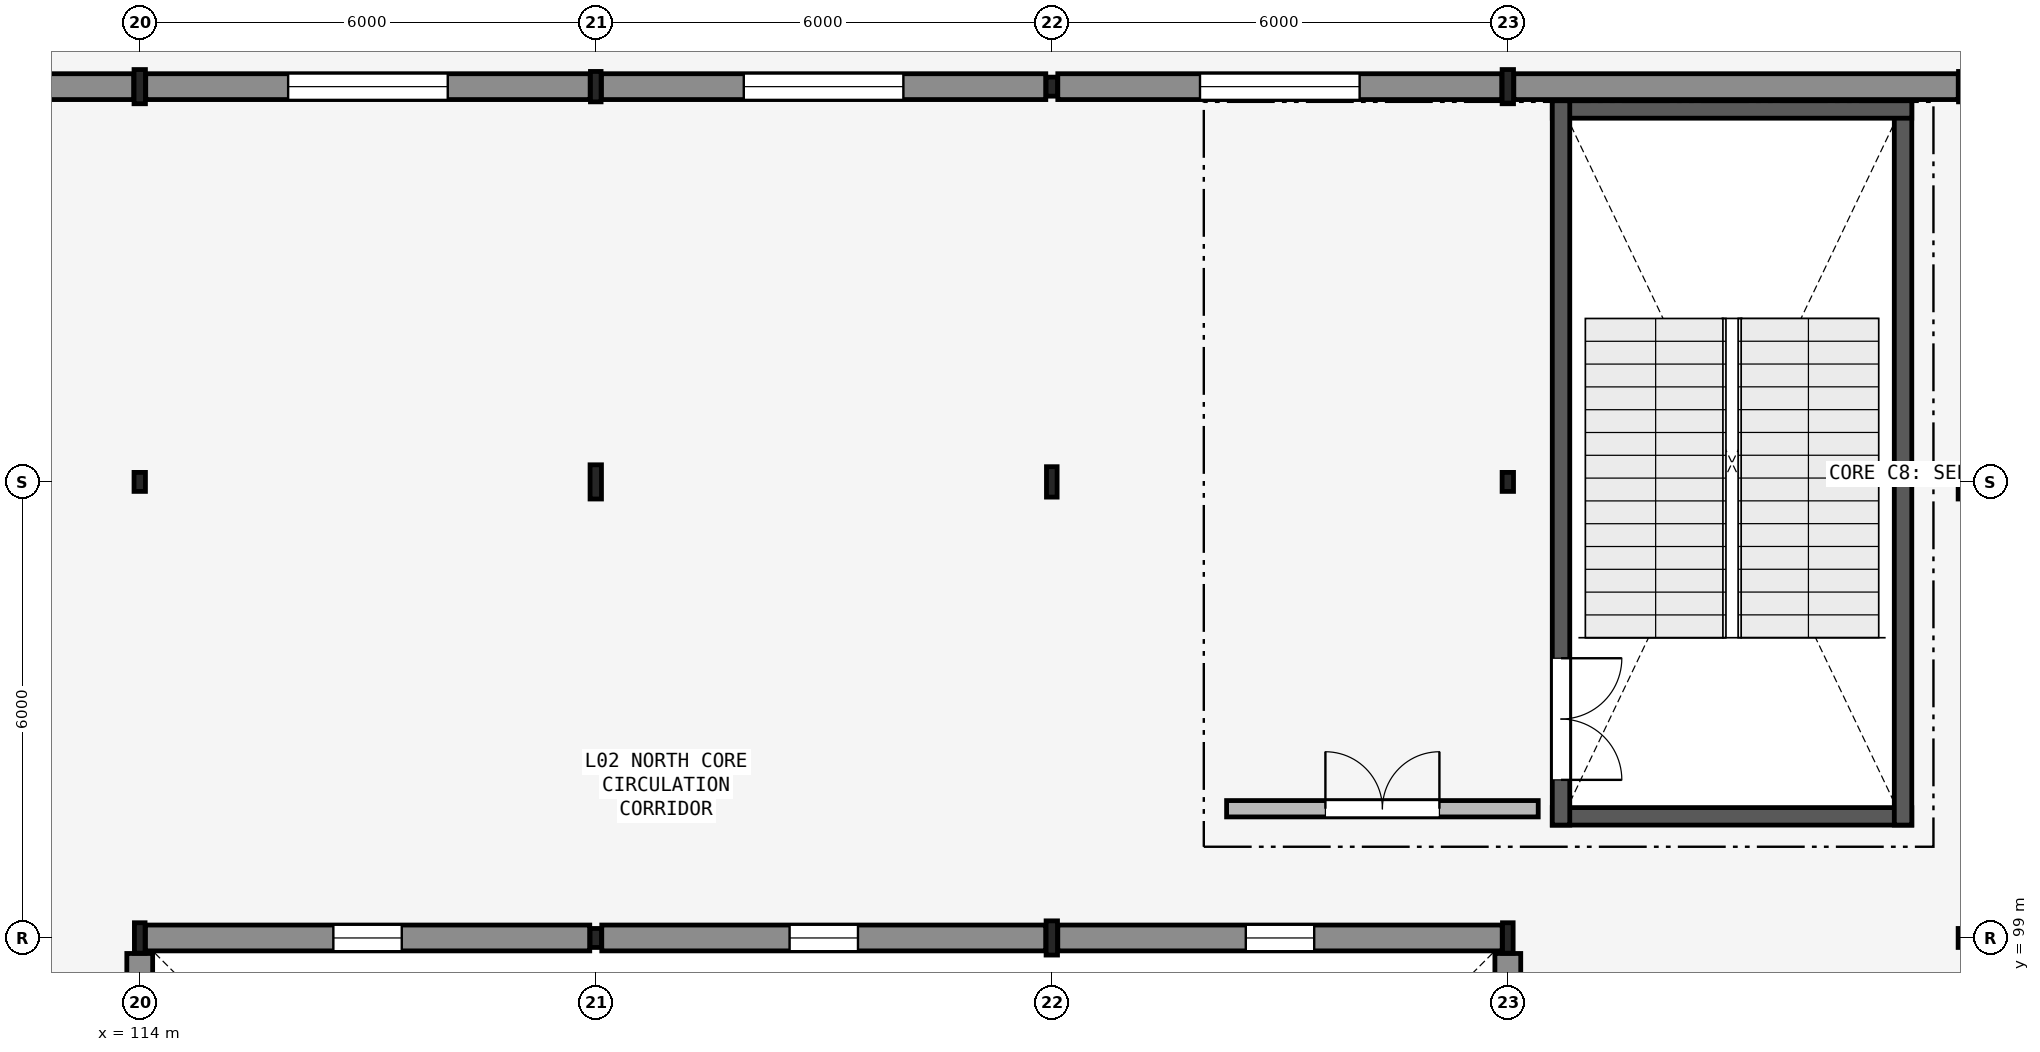
"""IFC4 building model, lengths in metres.
Left out: names, types, materials, properties, quantities, classifications, styles, units other than length and angle.
Written with IfcOpenShell. Run it as: python <this file> out.ifc"""

import sys

from ifc_helpers import new_model, si_unit, direction, frame, frame_2d, origin, origin_2d, place, context, subcontext, project, spatial, rectangle, hollow_rectangle, i_section, extrude, element, fill, save


model = new_model("IFC4")
c1 = context("Model", 3, precision=1e-05, world=origin(), true_north=direction((0.0, 1.0)))
c2 = subcontext(c1, "Body", "Model", "MODEL_VIEW")
j1 = project(units=[si_unit("LENGTHUNIT", "METRE"), si_unit("PLANEANGLEUNIT", "RADIAN")], contexts=[c1])
p1 = place(None, origin())
s1 = spatial("IfcSite", under=j1, at=p1, CompositionType="ELEMENT")
p2 = place(p1, origin())
s2 = spatial("IfcBuilding", under=s1, at=p2, CompositionType="ELEMENT")
p3 = place(p2, frame((0.0, 0.0, 9.3)))
s3 = spatial("IfcBuildingStorey", under=s2, at=p3, CompositionType="ELEMENT", Elevation=9.3)
p4 = place(p3, frame((114.0, 99.0, 0.0), z_axis=(0.0, 0.0, 1.0), x_axis=(1.0, 0.0, 0.0)))
e1 = element("IfcColumn", 1, at=p4, inside=s3, PredefinedType="COLUMN", context=c2, shape_type="SweptSolid", body=[
    extrude(i_section(OverallWidth=0.14, OverallDepth=0.4, WebThickness=0.009, FlangeThickness=0.016, FilletRadius=0.014, at=origin_2d()), origin(), (0.0, 0.0, 1.0), 4.2),
])
p5 = place(p3, frame((114.0, 105.0, 0.0), z_axis=(0.0, 0.0, 1.0), x_axis=(1.0, 0.0, 0.0)))
e2 = element("IfcColumn", 2, at=p5, inside=s3, PredefinedType="COLUMN", context=c2, shape_type="SweptSolid", body=[
    extrude(hollow_rectangle(XDim=0.15, YDim=0.25, WallThickness=0.01, InnerFilletRadius=0.01, OuterFilletRadius=0.02, at=origin_2d()), origin(), (0.0, 0.0, 1.0), 4.2),
])
p6 = place(p3, frame((114.0, 110.2, 0.0), z_axis=(0.0, 0.0, 1.0), x_axis=(1.0, 0.0, 0.0)))
e3 = element("IfcColumn", 3, at=p6, inside=s3, PredefinedType="COLUMN", context=c2, shape_type="SweptSolid", body=[
    extrude(i_section(OverallWidth=0.15, OverallDepth=0.45, WebThickness=0.01, FlangeThickness=0.017, FilletRadius=0.015, at=origin_2d()), origin(), (0.0, 0.0, 1.0), 4.2),
])
p7 = place(p3, frame((120.0, 99.0, 0.0), z_axis=(0.0, 0.0, 1.0), x_axis=(1.0, 0.0, 0.0)))
e4 = element("IfcColumn", 4, at=p7, inside=s3, PredefinedType="COLUMN", context=c2, shape_type="SweptSolid", body=[
    extrude(hollow_rectangle(XDim=0.15, YDim=0.25, WallThickness=0.01, InnerFilletRadius=0.01, OuterFilletRadius=0.02, at=origin_2d()), origin(), (0.0, 0.0, 1.0), 4.2),
])
p8 = place(p3, frame((120.0, 105.0, 0.0), z_axis=(0.0, 0.0, 1.0), x_axis=(1.0, 0.0, 0.0)))
e5 = element("IfcColumn", 5, at=p8, inside=s3, PredefinedType="COLUMN", context=c2, shape_type="SweptSolid", body=[
    extrude(i_section(OverallWidth=0.15, OverallDepth=0.45, WebThickness=0.01, FlangeThickness=0.017, FilletRadius=0.015, at=origin_2d()), origin(), (0.0, 0.0, 1.0), 4.2),
])
p9 = place(p3, frame((120.0, 110.2, 0.0), z_axis=(0.0, 0.0, 1.0), x_axis=(1.0, 0.0, 0.0)))
e6 = element("IfcColumn", 6, at=p9, inside=s3, PredefinedType="COLUMN", context=c2, shape_type="SweptSolid", body=[
    extrude(i_section(OverallWidth=0.14, OverallDepth=0.4, WebThickness=0.009, FlangeThickness=0.016, FilletRadius=0.014, at=origin_2d()), origin(), (0.0, 0.0, 1.0), 4.2),
])
p10 = place(p3, frame((126.0, 99.0, 0.0), z_axis=(0.0, 0.0, 1.0), x_axis=(1.0, 0.0, 0.0)))
e7 = element("IfcColumn", 7, at=p10, inside=s3, PredefinedType="COLUMN", context=c2, shape_type="SweptSolid", body=[
    extrude(i_section(OverallWidth=0.15, OverallDepth=0.45, WebThickness=0.01, FlangeThickness=0.017, FilletRadius=0.015, at=origin_2d()), origin(), (0.0, 0.0, 1.0), 4.2),
])
p11 = place(p3, frame((126.0, 105.0, 0.0), z_axis=(0.0, 0.0, 1.0), x_axis=(1.0, 0.0, 0.0)))
e8 = element("IfcColumn", 8, at=p11, inside=s3, PredefinedType="COLUMN", context=c2, shape_type="SweptSolid", body=[
    extrude(i_section(OverallWidth=0.14, OverallDepth=0.4, WebThickness=0.009, FlangeThickness=0.016, FilletRadius=0.014, at=origin_2d()), origin(), (0.0, 0.0, 1.0), 4.2),
])
p12 = place(p3, frame((126.0, 110.2, 0.0), z_axis=(0.0, 0.0, 1.0), x_axis=(1.0, 0.0, 0.0)))
e9 = element("IfcColumn", 9, at=p12, inside=s3, PredefinedType="COLUMN", context=c2, shape_type="SweptSolid", body=[
    extrude(hollow_rectangle(XDim=0.15, YDim=0.25, WallThickness=0.01, InnerFilletRadius=0.01, OuterFilletRadius=0.02, at=origin_2d()), origin(), (0.0, 0.0, 1.0), 4.2),
])
p13 = place(p3, frame((132.0, 99.0, 0.0), z_axis=(0.0, 0.0, 1.0), x_axis=(1.0, 0.0, 0.0)))
e10 = element("IfcColumn", 10, at=p13, inside=s3, PredefinedType="COLUMN", context=c2, shape_type="SweptSolid", body=[
    extrude(i_section(OverallWidth=0.14, OverallDepth=0.4, WebThickness=0.009, FlangeThickness=0.016, FilletRadius=0.014, at=origin_2d()), origin(), (0.0, 0.0, 1.0), 4.2),
])
p14 = place(p3, frame((132.0, 105.0, 0.0), z_axis=(0.0, 0.0, 1.0), x_axis=(1.0, 0.0, 0.0)))
e11 = element("IfcColumn", 11, at=p14, inside=s3, PredefinedType="COLUMN", context=c2, shape_type="SweptSolid", body=[
    extrude(hollow_rectangle(XDim=0.15, YDim=0.25, WallThickness=0.01, InnerFilletRadius=0.01, OuterFilletRadius=0.02, at=origin_2d()), origin(), (0.0, 0.0, 1.0), 4.2),
])
p15 = place(p3, frame((132.0, 110.2, 0.0), z_axis=(0.0, 0.0, 1.0), x_axis=(1.0, 0.0, 0.0)))
e12 = element("IfcColumn", 12, at=p15, inside=s3, PredefinedType="COLUMN", context=c2, shape_type="SweptSolid", body=[
    extrude(i_section(OverallWidth=0.15, OverallDepth=0.45, WebThickness=0.01, FlangeThickness=0.017, FilletRadius=0.015, at=origin_2d()), origin(), (0.0, 0.0, 1.0), 4.2),
])
p16 = place(p3, frame((138.0, 99.0, 0.0), z_axis=(0.0, 0.0, 1.0), x_axis=(1.0, 0.0, 0.0)))
e13 = element("IfcColumn", 13, at=p16, inside=s3, PredefinedType="COLUMN", context=c2, shape_type="SweptSolid", body=[
    extrude(hollow_rectangle(XDim=0.15, YDim=0.25, WallThickness=0.01, InnerFilletRadius=0.01, OuterFilletRadius=0.02, at=origin_2d()), origin(), (0.0, 0.0, 1.0), 4.2),
])
p17 = place(p3, frame((138.0, 105.0, 0.0), z_axis=(0.0, 0.0, 1.0), x_axis=(1.0, 0.0, 0.0)))
e14 = element("IfcColumn", 14, at=p17, inside=s3, PredefinedType="COLUMN", context=c2, shape_type="SweptSolid", body=[
    extrude(i_section(OverallWidth=0.15, OverallDepth=0.45, WebThickness=0.01, FlangeThickness=0.017, FilletRadius=0.015, at=origin_2d()), origin(), (0.0, 0.0, 1.0), 4.2),
])
p18 = place(p3, frame((138.0, 110.2, 0.0), z_axis=(0.0, 0.0, 1.0), x_axis=(1.0, 0.0, 0.0)))
e15 = element("IfcColumn", 15, at=p18, inside=s3, PredefinedType="COLUMN", context=c2, shape_type="SweptSolid", body=[
    extrude(i_section(OverallWidth=0.14, OverallDepth=0.4, WebThickness=0.009, FlangeThickness=0.016, FilletRadius=0.014, at=origin_2d()), origin(), (0.0, 0.0, 1.0), 4.2),
])
p19 = place(p3, frame((108.079, 110.2, 0.0), z_axis=(0.0, 0.0, 1.0), x_axis=(1.0, 0.0, 0.0)))
e16 = element("IfcWall", 16, at=p19, inside=s3, PredefinedType="SOLIDWALL", context=c2, shape_type="SweptSolid", body=[
    extrude(rectangle(XDim=5.842, YDim=0.34, at=frame_2d((2.921, 0.0))), origin(), (0.0, 0.0, 1.0), 3.39),
])
p20 = place(p19, frame((1.871, 0.0, 0.9)))
e17 = element("IfcOpeningElement", 17, at=p20, cuts=e16, PredefinedType="OPENING", context=c2, shape_type="SweptSolid", body=[
    extrude(rectangle(XDim=2.1, YDim=1.5, at=frame_2d((1.05, 0.75))), frame((0.0, 0.18, 0.0), z_axis=(0.0, -1.0, 0.0), x_axis=(1.0, 0.0, 0.0)), (0.0, 0.0, 1.0), 0.36),
])
p21 = place(p3, frame((114.079, 110.2, 0.0), z_axis=(0.0, 0.0, 1.0), x_axis=(1.0, 0.0, 0.0)))
e18 = element("IfcWall", 18, at=p21, inside=s3, PredefinedType="SOLIDWALL", context=c2, shape_type="SweptSolid", body=[
    extrude(rectangle(XDim=5.847, YDim=0.34, at=frame_2d((2.923, 0.0))), origin(), (0.0, 0.0, 1.0), 3.39),
])
p22 = place(p21, frame((1.874, 0.0, 0.9)))
e19 = element("IfcOpeningElement", 19, at=p22, cuts=e18, PredefinedType="OPENING", context=c2, shape_type="SweptSolid", body=[
    extrude(rectangle(XDim=2.1, YDim=1.5, at=frame_2d((1.05, 0.75))), frame((0.0, 0.18, 0.0), z_axis=(0.0, -1.0, 0.0), x_axis=(1.0, 0.0, 0.0)), (0.0, 0.0, 1.0), 0.36),
])
p23 = place(p3, frame((120.074, 110.2, 0.0), z_axis=(0.0, 0.0, 1.0), x_axis=(1.0, 0.0, 0.0)))
e20 = element("IfcWall", 20, at=p23, inside=s3, PredefinedType="SOLIDWALL", context=c2, shape_type="SweptSolid", body=[
    extrude(rectangle(XDim=5.847, YDim=0.34, at=frame_2d((2.923, 0.0))), origin(), (0.0, 0.0, 1.0), 3.39),
])
p24 = place(p23, frame((1.874, 0.0, 0.9)))
e21 = element("IfcOpeningElement", 21, at=p24, cuts=e20, PredefinedType="OPENING", context=c2, shape_type="SweptSolid", body=[
    extrude(rectangle(XDim=2.1, YDim=1.5, at=frame_2d((1.05, 0.75))), frame((0.0, 0.18, 0.0), z_axis=(0.0, -1.0, 0.0), x_axis=(1.0, 0.0, 0.0)), (0.0, 0.0, 1.0), 0.36),
])
p25 = place(p3, frame((126.079, 110.2, 0.0), z_axis=(0.0, 0.0, 1.0), x_axis=(1.0, 0.0, 0.0)))
e22 = element("IfcWall", 22, at=p25, inside=s3, PredefinedType="SOLIDWALL", context=c2, shape_type="SweptSolid", body=[
    extrude(rectangle(XDim=5.842, YDim=0.34, at=frame_2d((2.921, 0.0))), origin(), (0.0, 0.0, 1.0), 3.39),
])
p26 = place(p25, frame((1.871, 0.0, 0.9)))
e23 = element("IfcOpeningElement", 23, at=p26, cuts=e22, PredefinedType="OPENING", context=c2, shape_type="SweptSolid", body=[
    extrude(rectangle(XDim=2.1, YDim=1.5, at=frame_2d((1.05, 0.75))), frame((0.0, 0.18, 0.0), z_axis=(0.0, -1.0, 0.0), x_axis=(1.0, 0.0, 0.0)), (0.0, 0.0, 1.0), 0.36),
])
p27 = place(p3, frame((132.079, 110.2, 0.0), z_axis=(0.0, 0.0, 1.0), x_axis=(1.0, 0.0, 0.0)))
e24 = element("IfcWall", 24, at=p27, inside=s3, PredefinedType="SOLIDWALL", context=c2, shape_type="SweptSolid", body=[
    extrude(rectangle(XDim=5.847, YDim=0.34, at=frame_2d((2.923, 0.0))), origin(), (0.0, 0.0, 1.0), 3.39),
])
p28 = place(p3, frame((114.074, 99.0, 0.0), z_axis=(0.0, 0.0, 1.0), x_axis=(1.0, 0.0, 0.0)))
e25 = element("IfcWall", 25, at=p28, inside=s3, PredefinedType="SOLIDWALL", context=c2, shape_type="SweptSolid", body=[
    extrude(rectangle(XDim=5.847, YDim=0.34, at=frame_2d((2.923, 0.0))), origin(), (0.0, 0.0, 1.0), 3.484),
])
p29 = place(p28, frame((2.473, 0.0, 1.6)))
e26 = element("IfcOpeningElement", 26, at=p29, cuts=e25, PredefinedType="OPENING", context=c2, shape_type="SweptSolid", body=[
    extrude(rectangle(XDim=0.9, YDim=0.6, at=frame_2d((0.45, 0.3))), frame((0.0, 0.18, 0.0), z_axis=(0.0, -1.0, 0.0), x_axis=(1.0, 0.0, 0.0)), (0.0, 0.0, 1.0), 0.36),
])
p30 = place(p3, frame((120.079, 99.0, 0.0), z_axis=(0.0, 0.0, 1.0), x_axis=(1.0, 0.0, 0.0)))
e27 = element("IfcWall", 27, at=p30, inside=s3, PredefinedType="SOLIDWALL", context=c2, shape_type="SweptSolid", body=[
    extrude(rectangle(XDim=5.842, YDim=0.34, at=frame_2d((2.921, 0.0))), origin(), (0.0, 0.0, 1.0), 3.49),
])
p31 = place(p30, frame((2.471, 0.0, 1.6)))
e28 = element("IfcOpeningElement", 28, at=p31, cuts=e27, PredefinedType="OPENING", context=c2, shape_type="SweptSolid", body=[
    extrude(rectangle(XDim=0.9, YDim=0.6, at=frame_2d((0.45, 0.3))), frame((0.0, 0.18, 0.0), z_axis=(0.0, -1.0, 0.0), x_axis=(1.0, 0.0, 0.0)), (0.0, 0.0, 1.0), 0.36),
])
p32 = place(p3, frame((126.079, 99.0, 0.0), z_axis=(0.0, 0.0, 1.0), x_axis=(1.0, 0.0, 0.0)))
e29 = element("IfcWall", 29, at=p32, inside=s3, PredefinedType="SOLIDWALL", context=c2, shape_type="SweptSolid", body=[
    extrude(rectangle(XDim=5.847, YDim=0.34, at=frame_2d((2.923, 0.0))), origin(), (0.0, 0.0, 1.0), 3.484),
])
p33 = place(p32, frame((2.473, 0.0, 1.6)))
e30 = element("IfcOpeningElement", 30, at=p33, cuts=e29, PredefinedType="OPENING", context=c2, shape_type="SweptSolid", body=[
    extrude(rectangle(XDim=0.9, YDim=0.6, at=frame_2d((0.45, 0.3))), frame((0.0, 0.18, 0.0), z_axis=(0.0, -1.0, 0.0), x_axis=(1.0, 0.0, 0.0)), (0.0, 0.0, 1.0), 0.36),
])
p34 = place(p3, frame((114.0, 93.229, 0.0), z_axis=(0.0, 0.0, 1.0), x_axis=(0.0, 1.0, 0.0)))
e31 = element("IfcWall", 31, at=p34, inside=s3, PredefinedType="SOLIDWALL", context=c2, shape_type="SweptSolid", body=[
    extrude(rectangle(XDim=5.567, YDim=0.34, at=frame_2d((2.783, 0.0))), origin(), (0.0, 0.0, 1.0), 3.34),
])
p35 = place(p34, frame((2.333, 0.0, 1.6)))
e32 = element("IfcOpeningElement", 32, at=p35, cuts=e31, PredefinedType="OPENING", context=c2, shape_type="SweptSolid", body=[
    extrude(rectangle(XDim=0.9, YDim=0.6, at=frame_2d((0.45, 0.3))), frame((0.0, 0.18, 0.0), z_axis=(0.0, -1.0, 0.0), x_axis=(1.0, 0.0, 0.0)), (0.0, 0.0, 1.0), 0.36),
])
p36 = place(p3, frame((132.0, 93.229, 0.0), z_axis=(0.0, 0.0, 1.0), x_axis=(0.0, 1.0, 0.0)))
e33 = element("IfcWall", 33, at=p36, inside=s3, PredefinedType="SOLIDWALL", context=c2, shape_type="SweptSolid", body=[
    extrude(rectangle(XDim=5.567, YDim=0.34, at=frame_2d((2.783, 0.0))), origin(), (0.0, 0.0, 1.0), 3.39),
])
p37 = place(p36, frame((2.333, 0.0, 1.6)))
e34 = element("IfcOpeningElement", 34, at=p37, cuts=e33, PredefinedType="OPENING", context=c2, shape_type="SweptSolid", body=[
    extrude(rectangle(XDim=0.9, YDim=0.6, at=frame_2d((0.45, 0.3))), frame((0.0, 0.18, 0.0), z_axis=(0.0, -1.0, 0.0), x_axis=(1.0, 0.0, 0.0)), (0.0, 0.0, 1.0), 0.36),
])
p38 = place(p3, frame((132.585, 100.6, 0.0), z_axis=(0.0, 0.0, 1.0), x_axis=(1.0, 0.0, 0.0)))
e35 = element("IfcWall", 35, at=p38, inside=s3, PredefinedType="SHEAR", context=c2, shape_type="SweptSolid", body=[
    extrude(rectangle(XDim=4.73, YDim=0.23, at=frame_2d((2.365, 0.0))), origin(), (0.0, 0.0, 1.0), 4.06),
])
p39 = place(p3, frame((137.2, 100.485, 0.0), z_axis=(0.0, 0.0, 1.0), x_axis=(0.0, 1.0, 0.0)))
e36 = element("IfcWall", 36, at=p39, inside=s3, PredefinedType="SHEAR", context=c2, shape_type="SweptSolid", body=[
    extrude(rectangle(XDim=9.53, YDim=0.23, at=frame_2d((4.765, 0.0))), origin(), (0.0, 0.0, 1.0), 4.06),
])
p40 = place(p3, frame((137.315, 109.9, 0.0), z_axis=(0.0, 0.0, 1.0), x_axis=(-1.0, 0.0, 0.0)))
e37 = element("IfcWall", 37, at=p40, inside=s3, PredefinedType="SHEAR", context=c2, shape_type="SweptSolid", body=[
    extrude(rectangle(XDim=4.73, YDim=0.23, at=frame_2d((2.365, 0.0))), origin(), (0.0, 0.0, 1.0), 4.06),
])
p41 = place(p3, frame((132.7, 110.015, 0.0), z_axis=(0.0, 0.0, 1.0), x_axis=(0.0, -1.0, 0.0)))
e38 = element("IfcWall", 38, at=p41, inside=s3, PredefinedType="SHEAR", context=c2, shape_type="SweptSolid", body=[
    extrude(rectangle(XDim=9.53, YDim=0.23, at=frame_2d((4.765, 0.0))), origin(), (0.0, 0.0, 1.0), 4.06),
])
p42 = place(p41, frame((7.335, 0.0, 0.0)))
e39 = element("IfcOpeningElement", 39, at=p42, cuts=e38, PredefinedType="OPENING", context=c2, shape_type="SweptSolid", body=[
    extrude(rectangle(XDim=1.6, YDim=2.2, at=frame_2d((0.8, 1.1))), frame((0.0, 0.125, 0.0), z_axis=(0.0, -1.0, 0.0), x_axis=(1.0, 0.0, 0.0)), (0.0, 0.0, 1.0), 0.25),
])
p43 = place(p3, frame((128.3, 100.7, 0.0), z_axis=(0.0, 0.0, 1.0), x_axis=(1.0, 0.0, 0.0)))
e40 = element("IfcWall", 40, at=p43, inside=s3, PredefinedType="PARTITIONING", context=c2, shape_type="SweptSolid", body=[
    extrude(rectangle(XDim=4.1, YDim=0.215, at=frame_2d((2.05, 0.0))), origin(), (0.0, 0.0, 1.0), 3.54),
])
p44 = place(p43, frame((1.3, 0.0, 0.0)))
e41 = element("IfcOpeningElement", 41, at=p44, cuts=e40, PredefinedType="OPENING", context=c2, shape_type="SweptSolid", body=[
    extrude(rectangle(XDim=1.5, YDim=2.15, at=frame_2d((0.75, 1.075))), frame((0.0, 0.117, 0.0), z_axis=(0.0, -1.0, 0.0), x_axis=(1.0, 0.0, 0.0)), (0.0, 0.0, 1.0), 0.235),
])
p45 = place(p22, origin())
e42 = element("IfcWindow", 42, at=p45, inside=s3, PartitioningType="SINGLE_PANEL", PredefinedType="WINDOW", context=c2, shape_type="SweptSolid", body=[
    extrude(rectangle(XDim=2.1, YDim=1.5, at=frame_2d((1.05, 0.75))), frame((0.0, 0.03, 0.0), z_axis=(0.0, -1.0, 0.0), x_axis=(1.0, 0.0, 0.0)), (0.0, 0.0, 1.0), 0.06),
])
fill(e19, e42)
p46 = place(p24, origin())
e43 = element("IfcWindow", 43, at=p46, inside=s3, PartitioningType="SINGLE_PANEL", PredefinedType="WINDOW", context=c2, shape_type="SweptSolid", body=[
    extrude(rectangle(XDim=2.1, YDim=1.5, at=frame_2d((1.05, 0.75))), frame((0.0, 0.03, 0.0), z_axis=(0.0, -1.0, 0.0), x_axis=(1.0, 0.0, 0.0)), (0.0, 0.0, 1.0), 0.06),
])
fill(e21, e43)
p47 = place(p26, origin())
e44 = element("IfcWindow", 44, at=p47, inside=s3, PartitioningType="SINGLE_PANEL", PredefinedType="WINDOW", context=c2, shape_type="SweptSolid", body=[
    extrude(rectangle(XDim=2.1, YDim=1.5, at=frame_2d((1.05, 0.75))), frame((0.0, 0.03, 0.0), z_axis=(0.0, -1.0, 0.0), x_axis=(1.0, 0.0, 0.0)), (0.0, 0.0, 1.0), 0.06),
])
fill(e23, e44)
p48 = place(p29, origin())
e45 = element("IfcWindow", 45, at=p48, inside=s3, PartitioningType="SINGLE_PANEL", PredefinedType="WINDOW", context=c2, shape_type="SweptSolid", body=[
    extrude(rectangle(XDim=0.9, YDim=0.6, at=frame_2d((0.45, 0.3))), frame((0.0, 0.03, 0.0), z_axis=(0.0, -1.0, 0.0), x_axis=(1.0, 0.0, 0.0)), (0.0, 0.0, 1.0), 0.06),
])
fill(e26, e45)
p49 = place(p31, origin())
e46 = element("IfcWindow", 46, at=p49, inside=s3, PartitioningType="SINGLE_PANEL", PredefinedType="WINDOW", context=c2, shape_type="SweptSolid", body=[
    extrude(rectangle(XDim=0.9, YDim=0.6, at=frame_2d((0.45, 0.3))), frame((0.0, 0.03, 0.0), z_axis=(0.0, -1.0, 0.0), x_axis=(1.0, 0.0, 0.0)), (0.0, 0.0, 1.0), 0.06),
])
fill(e28, e46)
p50 = place(p33, origin())
e47 = element("IfcWindow", 47, at=p50, inside=s3, PartitioningType="SINGLE_PANEL", PredefinedType="WINDOW", context=c2, shape_type="SweptSolid", body=[
    extrude(rectangle(XDim=0.9, YDim=0.6, at=frame_2d((0.45, 0.3))), frame((0.0, 0.03, 0.0), z_axis=(0.0, -1.0, 0.0), x_axis=(1.0, 0.0, 0.0)), (0.0, 0.0, 1.0), 0.06),
])
fill(e30, e47)
p51 = place(p42, origin())
e48 = element("IfcDoor", 48, at=p51, inside=s3, OperationType="DOUBLE_DOOR_SINGLE_SWING", PredefinedType="DOOR", context=c2, shape_type="SweptSolid", body=[
    extrude(rectangle(XDim=1.6, YDim=2.2, at=frame_2d((0.8, 1.1))), frame((0.0, 0.025, 0.0), z_axis=(0.0, -1.0, 0.0), x_axis=(1.0, 0.0, 0.0)), (0.0, 0.0, 1.0), 0.05),
])
fill(e39, e48)
p52 = place(p44, origin())
e49 = element("IfcDoor", 49, at=p52, inside=s3, OperationType="DOUBLE_DOOR_SINGLE_SWING", PredefinedType="DOOR", context=c2, shape_type="SweptSolid", body=[
    extrude(rectangle(XDim=1.5, YDim=2.15, at=frame_2d((0.75, 1.075))), frame((0.0, 0.025, 0.0), z_axis=(0.0, -1.0, 0.0), x_axis=(1.0, 0.0, 0.0)), (0.0, 0.0, 1.0), 0.05),
])
fill(e41, e49)
save(model, sys.argv[1])
